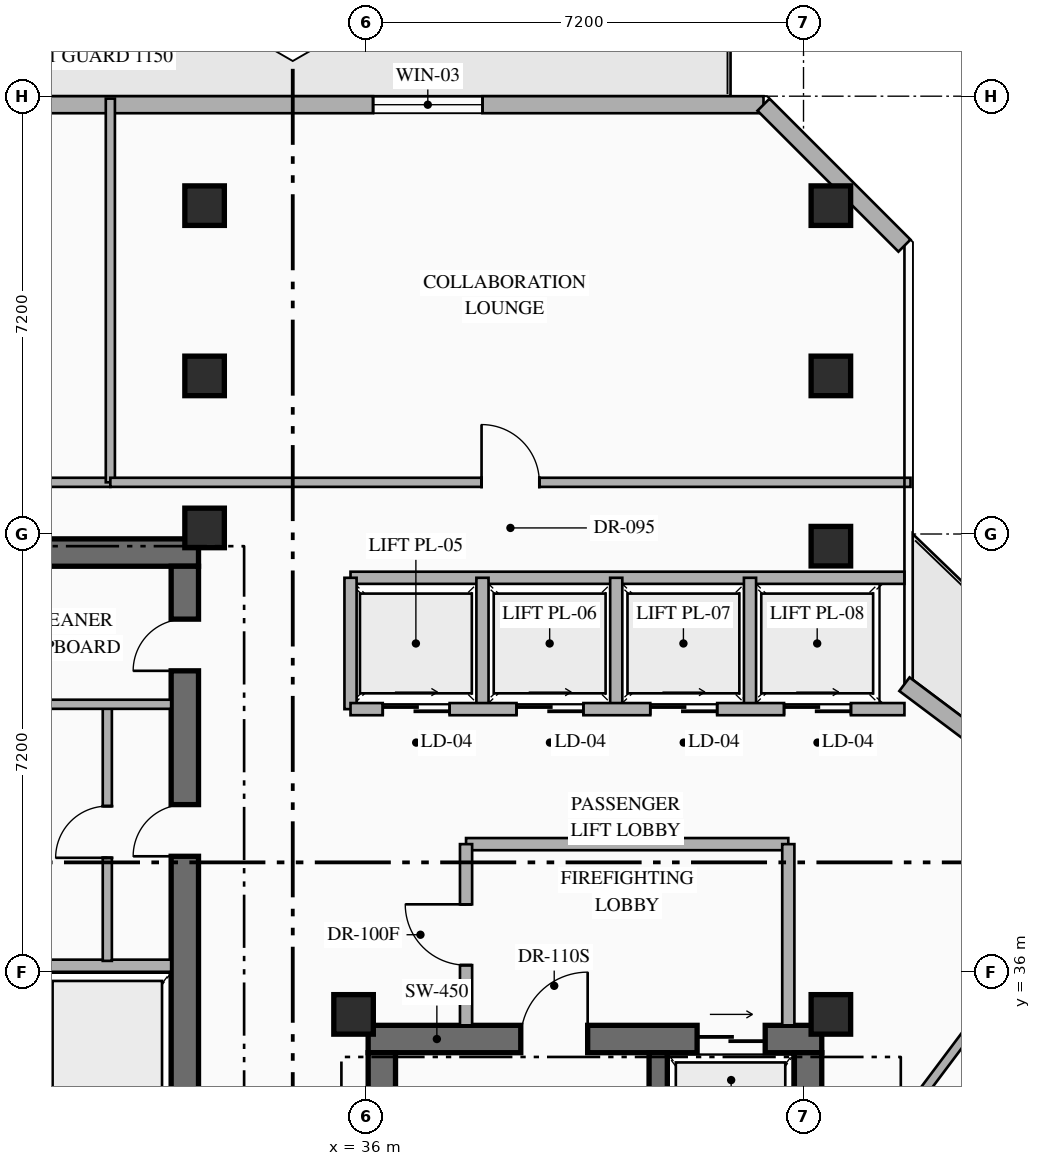
"""IFC4 building model, lengths in metres.
Left out: names, types, materials, properties, quantities, classifications, styles, units other than length and angle.
Written with IfcOpenShell. Run it as: python <this file> out.ifc"""

import sys

from ifc_helpers import new_model, si_unit, direction, frame, frame_2d, origin, origin_2d, place, context, subcontext, project, spatial, rectangle, hollow_rectangle, extrude, element, fill, save


model = new_model("IFC4")
c1 = context("Model", 3, precision=1e-05, world=origin(), true_north=direction((0.0, 1.0)))
c2 = subcontext(c1, "Body", "Model", "MODEL_VIEW")
j1 = project(units=[si_unit("LENGTHUNIT", "METRE"), si_unit("PLANEANGLEUNIT", "RADIAN")], contexts=[c1])
p1 = place(None, origin())
s1 = spatial("IfcSite", under=j1, at=p1, CompositionType="ELEMENT")
p2 = place(p1, origin())
s2 = spatial("IfcBuilding", under=s1, at=p2, CompositionType="ELEMENT")
p3 = place(p2, frame((0.0, 0.0, 253.95)))
s3 = spatial("IfcBuildingStorey", under=s2, at=p3, CompositionType="ELEMENT", Elevation=253.95)
p4 = place(p3, frame((25.77, 42.895, 0.0), z_axis=(0.0, 0.0, 1.0), x_axis=(1.0, 0.0, 0.0)))
e1 = element("IfcWall", 1, at=p4, inside=s3, PredefinedType="SHEAR", context=c2, shape_type="SweptSolid", body=[
    extrude(rectangle(XDim=7.48, YDim=0.45, at=frame_2d((3.74, 0.0))), origin(), (0.0, 0.0, 1.0), 3.6),
])
p5 = place(p3, frame((33.025, 33.19, 0.0), z_axis=(0.0, 0.0, 1.0), x_axis=(0.0, 1.0, 0.0)))
e2 = element("IfcWall", 2, at=p5, inside=s3, PredefinedType="SHEAR", context=c2, shape_type="SweptSolid", body=[
    extrude(rectangle(XDim=9.48, YDim=0.45, at=frame_2d((4.74, 0.0))), origin(), (0.0, 0.0, 1.0), 3.6),
])
p6 = place(p5, frame((4.71, 0.0, 0.0)))
e3 = element("IfcOpeningElement", 3, at=p6, cuts=e2, PredefinedType="OPENING", context=c2, shape_type="SweptSolid", body=[
    extrude(rectangle(XDim=0.85, YDim=2.08, at=frame_2d((0.425, 1.04))), frame((0.0, 0.235, 0.0), z_axis=(0.0, -1.0, 0.0), x_axis=(1.0, 0.0, 0.0)), (0.0, 0.0, 1.0), 0.47),
])
p7 = place(p5, frame((7.76, 0.0, 0.0)))
e4 = element("IfcOpeningElement", 4, at=p7, cuts=e2, PredefinedType="OPENING", context=c2, shape_type="SweptSolid", body=[
    extrude(rectangle(XDim=0.85, YDim=2.08, at=frame_2d((0.425, 1.04))), frame((0.0, 0.235, 0.0), z_axis=(0.0, -1.0, 0.0), x_axis=(1.0, 0.0, 0.0)), (0.0, 0.0, 1.0), 0.47),
])
p8 = place(p3, frame((36.04, 34.895, 0.0), z_axis=(0.0, 0.0, 1.0), x_axis=(1.0, 0.0, 0.0)))
e5 = element("IfcWall", 5, at=p8, inside=s3, PredefinedType="SHEAR", context=c2, shape_type="SweptSolid", body=[
    extrude(rectangle(XDim=7.46, YDim=0.45, at=frame_2d((3.73, 0.0))), origin(), (0.0, 0.0, 1.0), 3.6),
])
p9 = place(p8, frame((2.51, 0.0, 0.0)))
e6 = element("IfcOpeningElement", 6, at=p9, cuts=e5, PredefinedType="OPENING", context=c2, shape_type="SweptSolid", body=[
    extrude(rectangle(XDim=1.1, YDim=2.2, at=frame_2d((0.55, 1.1))), frame((0.0, 0.235, 0.0), z_axis=(0.0, -1.0, 0.0), x_axis=(1.0, 0.0, 0.0)), (0.0, 0.0, 1.0), 0.47),
])
p10 = place(p8, frame((5.41, 0.0, 0.0)))
e7 = element("IfcOpeningElement", 7, at=p10, cuts=e5, PredefinedType="OPENING", context=c2, shape_type="SweptSolid", body=[
    extrude(rectangle(XDim=1.12, YDim=2.15, at=frame_2d((0.56, 1.075))), frame((0.0, 0.235, 0.0), z_axis=(0.0, -1.0, 0.0), x_axis=(1.0, 0.0, 0.0)), (0.0, 0.0, 1.0), 0.47),
])
p11 = place(p3, frame((36.265, 25.19, 0.0), z_axis=(0.0, 0.0, 1.0), x_axis=(0.0, 1.0, 0.0)))
e8 = element("IfcWall", 8, at=p11, inside=s3, PredefinedType="SHEAR", context=c2, shape_type="SweptSolid", body=[
    extrude(rectangle(XDim=9.48, YDim=0.45, at=frame_2d((4.74, 0.0))), origin(), (0.0, 0.0, 1.0), 3.6),
])
p12 = place(p3, frame((43.275, 25.19, 0.0), z_axis=(0.0, 0.0, 1.0), x_axis=(0.0, 1.0, 0.0)))
e9 = element("IfcWall", 9, at=p12, inside=s3, PredefinedType="SHEAR", context=c2, shape_type="SweptSolid", body=[
    extrude(rectangle(XDim=9.48, YDim=0.45, at=frame_2d((4.74, 0.0))), origin(), (0.0, 0.0, 1.0), 3.6),
])
p13 = place(p12, frame((1.51, 0.0, 0.0)))
e10 = element("IfcOpeningElement", 10, at=p13, cuts=e9, PredefinedType="OPENING", context=c2, shape_type="SweptSolid", body=[
    extrude(rectangle(XDim=0.85, YDim=2.08, at=frame_2d((0.425, 1.04))), frame((0.0, 0.235, 0.0), z_axis=(0.0, -1.0, 0.0), x_axis=(1.0, 0.0, 0.0)), (0.0, 0.0, 1.0), 0.47),
])
p14 = place(p12, frame((4.76, 0.0, 0.0)))
e11 = element("IfcOpeningElement", 11, at=p14, cuts=e9, PredefinedType="OPENING", context=c2, shape_type="SweptSolid", body=[
    extrude(rectangle(XDim=0.85, YDim=2.08, at=frame_2d((0.425, 1.04))), frame((0.0, 0.235, 0.0), z_axis=(0.0, -1.0, 0.0), x_axis=(1.0, 0.0, 0.0)), (0.0, 0.0, 1.0), 0.47),
])
p15 = place(p3, frame((40.81, 25.19, 0.0), z_axis=(0.0, 0.0, 1.0), x_axis=(0.0, 1.0, 0.0)))
e12 = element("IfcWall", 12, at=p15, inside=s3, PredefinedType="SHEAR", context=c2, shape_type="SweptSolid", body=[
    extrude(rectangle(XDim=9.48, YDim=0.3, at=frame_2d((4.74, 0.0))), origin(), (0.0, 0.0, 1.0), 3.6),
])
for number, where, z_axis, x_axis in (
    (13, (33.35, 43.3, 0.0), (0.0, 0.0, 1.0), (1.0, 0.0, 0.0)),
    (14, (35.8, 35.3, 0.0), (0.0, 0.0, 1.0), (1.0, 0.0, 0.0)),
    (15, (43.65, 35.3, 0.0), (0.0, 0.0, 1.0), (1.0, 0.0, 0.0)),
    (16, (43.65, 43.0, 0.0), (0.0, 0.0, 1.0), (1.0, 0.0, 0.0)),
    (17, (33.35, 45.8, 0.0), (0.0, 0.0, 1.0), (1.0, 0.0, 0.0)),
    (18, (43.65, 45.8, 0.0), (0.0, 0.0, 1.0), (1.0, 0.0, 0.0)),
    (19, (33.35, 48.6, 0.0), (0.0, 0.0, 1.0), (1.0, 0.0, 0.0)),
    (20, (43.65, 48.6, 0.0), (0.0, 0.0, 1.0), (1.0, 0.0, 0.0)),
):
    element("IfcColumn", number, at=place(p3, frame(where, z_axis=z_axis, x_axis=x_axis)), inside=s3, PredefinedType="COLUMN", context=c2, shape_type="SweptSolid", body=[
        extrude(hollow_rectangle(XDim=0.65, YDim=0.65, WallThickness=0.025, at=origin_2d()), origin(), (0.0, 0.0, 1.0), 3.6),
    ])
p16 = place(p3, frame((44.86, 40.73, 0.0), z_axis=(0.0, 0.0, 1.0), x_axis=(0.800022950109, -0.599969398635, 0.0)))
e21 = element("IfcWall", 21, at=p16, inside=s3, PredefinedType="STANDARD", context=c2, shape_type="SweptSolid", body=[
    extrude(rectangle(XDim=10.212, YDim=0.28, at=frame_2d((5.106, 0.0))), origin(), (0.0, 0.0, 1.0), 3.35),
])
p17 = place(p16, frame((1.901, 0.0, 0.0)))
e22 = element("IfcOpeningElement", 22, at=p17, cuts=e21, PredefinedType="OPENING", context=c2, shape_type="SweptSolid", body=[
    extrude(rectangle(XDim=1.1, YDim=2.2, at=frame_2d((0.55, 1.1))), frame((0.0, 0.15, 0.0), z_axis=(0.0, -1.0, 0.0), x_axis=(1.0, 0.0, 0.0)), (0.0, 0.0, 1.0), 0.3),
])
p18 = place(p16, frame((5.84, 0.0, 0.85)))
e23 = element("IfcOpeningElement", 23, at=p18, cuts=e21, PredefinedType="OPENING", context=c2, shape_type="SweptSolid", body=[
    extrude(rectangle(XDim=1.8, YDim=2.1, at=frame_2d((0.9, 1.05))), frame((0.0, 0.15, 0.0), z_axis=(0.0, -1.0, 0.0), x_axis=(1.0, 0.0, 0.0)), (0.0, 0.0, 1.0), 0.3),
])
p19 = place(p3, frame((20.458, 50.26, 0.0), z_axis=(0.0, 0.0, 1.0), x_axis=(1.0, 0.0, 0.0)))
e24 = element("IfcWall", 24, at=p19, inside=s3, PredefinedType="STANDARD", context=c2, shape_type="SweptSolid", body=[
    extrude(rectangle(XDim=22.084, YDim=0.28, at=frame_2d((11.042, 0.0))), origin(), (0.0, 0.0, 1.0), 3.35),
])
p20 = place(p19, frame((2.1, 0.0, 0.0)))
e25 = element("IfcOpeningElement", 25, at=p20, cuts=e24, PredefinedType="OPENING", context=c2, shape_type="SweptSolid", body=[
    extrude(rectangle(XDim=1.1, YDim=2.2, at=frame_2d((0.55, 1.1))), frame((0.0, 0.15, 0.0), z_axis=(0.0, -1.0, 0.0), x_axis=(1.0, 0.0, 0.0)), (0.0, 0.0, 1.0), 0.3),
])
p21 = place(p19, frame((15.663, 0.0, 0.85)))
e26 = element("IfcOpeningElement", 26, at=p21, cuts=e24, PredefinedType="OPENING", context=c2, shape_type="SweptSolid", body=[
    extrude(rectangle(XDim=1.8, YDim=2.1, at=frame_2d((0.9, 1.05))), frame((0.0, 0.15, 0.0), z_axis=(0.0, -1.0, 0.0), x_axis=(1.0, 0.0, 0.0)), (0.0, 0.0, 1.0), 0.3),
])
p22 = place(p3, frame((42.542, 50.26, 0.0), z_axis=(0.0, 0.0, 1.0), x_axis=(0.707106781187, -0.707106781187, 0.0)))
e27 = element("IfcWall", 27, at=p22, inside=s3, PredefinedType="STANDARD", context=c2, shape_type="SweptSolid", body=[
    extrude(rectangle(XDim=3.278, YDim=0.28, at=frame_2d((1.639, 0.0))), origin(), (0.0, 0.0, 1.0), 3.35),
])
p23 = place(p3, frame((30.7, 36.1, 0.0), z_axis=(0.0, 0.0, 1.0), x_axis=(1.0, 0.0, 0.0)))
e28 = element("IfcWall", 28, at=p23, inside=s3, PredefinedType="STANDARD", context=c2, shape_type="SweptSolid", body=[
    extrude(rectangle(XDim=2.1, YDim=0.2, at=frame_2d((1.05, 0.0))), origin(), (0.0, 0.0, 1.0), 3.35),
])
p24 = place(p3, frame((31.75, 36.18, 0.0), z_axis=(0.0, 0.0, 1.0), x_axis=(0.0, 1.0, 0.0)))
e29 = element("IfcWall", 29, at=p24, inside=s3, PredefinedType="PARTITIONING", context=c2, shape_type="SweptSolid", body=[
    extrude(rectangle(XDim=4.24, YDim=0.15, at=frame_2d((2.12, 0.0))), origin(), (0.0, 0.0, 1.0), 3.35),
])
p25 = place(p24, frame((1.695, 0.0, 0.0)))
e30 = element("IfcOpeningElement", 30, at=p25, cuts=e29, PredefinedType="OPENING", context=c2, shape_type="SweptSolid", body=[
    extrude(rectangle(XDim=0.85, YDim=2.08, at=frame_2d((0.425, 1.04))), frame((0.0, 0.085, 0.0), z_axis=(0.0, -1.0, 0.0), x_axis=(1.0, 0.0, 0.0)), (0.0, 0.0, 1.0), 0.17),
])
p26 = place(p3, frame((30.7, 40.4, 0.0), z_axis=(0.0, 0.0, 1.0), x_axis=(1.0, 0.0, 0.0)))
e31 = element("IfcWall", 31, at=p26, inside=s3, PredefinedType="PARTITIONING", context=c2, shape_type="SweptSolid", body=[
    extrude(rectangle(XDim=2.1, YDim=0.15, at=frame_2d((1.05, 0.0))), origin(), (0.0, 0.0, 1.0), 3.35),
])
p27 = place(p3, frame((37.65, 38.1, 0.0), z_axis=(0.0, 0.0, 1.0), x_axis=(1.0, 0.0, 0.0)))
e32 = element("IfcWall", 32, at=p27, inside=s3, PredefinedType="STANDARD", context=c2, shape_type="SweptSolid", body=[
    extrude(rectangle(XDim=5.3, YDim=0.2, at=frame_2d((2.65, 0.0))), origin(), (0.0, 0.0, 1.0), 3.35),
])
p28 = place(p3, frame((42.95, 35.12, 0.0), z_axis=(0.0, 0.0, 1.0), x_axis=(0.0, 1.0, 0.0)))
e33 = element("IfcWall", 33, at=p28, inside=s3, PredefinedType="STANDARD", context=c2, shape_type="SweptSolid", body=[
    extrude(rectangle(XDim=2.98, YDim=0.2, at=frame_2d((1.49, 0.0))), origin(), (0.0, 0.0, 1.0), 3.35),
])
p29 = place(p3, frame((37.65, 35.12, 0.0), z_axis=(0.0, 0.0, 1.0), x_axis=(0.0, 1.0, 0.0)))
e34 = element("IfcWall", 34, at=p29, inside=s3, PredefinedType="STANDARD", context=c2, shape_type="SweptSolid", body=[
    extrude(rectangle(XDim=2.98, YDim=0.2, at=frame_2d((1.49, 0.0))), origin(), (0.0, 0.0, 1.0), 3.35),
])
p30 = place(p29, frame((0.99, 0.0, 0.0)))
e35 = element("IfcOpeningElement", 35, at=p30, cuts=e34, PredefinedType="OPENING", context=c2, shape_type="SweptSolid", body=[
    extrude(rectangle(XDim=1.0, YDim=2.2, at=frame_2d((0.5, 1.1))), frame((0.0, 0.11, 0.0), z_axis=(0.0, -1.0, 0.0), x_axis=(1.0, 0.0, 0.0)), (0.0, 0.0, 1.0), 0.22),
])
p31 = place(p3, frame((35.75, 42.48, 0.0), z_axis=(0.0, 0.0, 1.0), x_axis=(1.0, 0.0, 0.0)))
e36 = element("IfcWall", 36, at=p31, inside=s3, PredefinedType="STANDARD", context=c2, shape_type="SweptSolid", body=[
    extrude(rectangle(XDim=9.11, YDim=0.2, at=frame_2d((4.555, 0.0))), origin(), (0.0, 0.0, 1.0), 3.35),
])
for number, where, z_axis, x_axis in (
    (37, (35.75, 40.32, 0.0), (0.0, 0.0, 1.0), (0.0, 1.0, 0.0)),
    (38, (37.92, 40.32, 0.0), (0.0, 0.0, 1.0), (0.0, 1.0, 0.0)),
    (39, (40.12, 40.32, 0.0), (0.0, 0.0, 1.0), (0.0, 1.0, 0.0)),
    (40, (42.32, 40.32, 0.0), (0.0, 0.0, 1.0), (0.0, 1.0, 0.0)),
):
    element("IfcWall", number, at=place(p3, frame(where, z_axis=z_axis, x_axis=x_axis)), inside=s3, PredefinedType="STANDARD", context=c2, shape_type="SweptSolid", body=[
        extrude(rectangle(XDim=2.16, YDim=0.2, at=frame_2d((1.08, 0.0))), origin(), (0.0, 0.0, 1.0), 3.35),
    ])
p32 = place(p3, frame((35.75, 40.32, 0.0), z_axis=(0.0, 0.0, 1.0), x_axis=(1.0, 0.0, 0.0)))
e41 = element("IfcWall", 41, at=p32, inside=s3, PredefinedType="STANDARD", context=c2, shape_type="SweptSolid", body=[
    extrude(rectangle(XDim=9.11, YDim=0.2, at=frame_2d((4.555, 0.0))), origin(), (0.0, 0.0, 1.0), 3.35),
])
p33 = place(p32, frame((0.53, 0.0, 0.0)))
e42 = element("IfcOpeningElement", 42, at=p33, cuts=e41, PredefinedType="OPENING", context=c2, shape_type="SweptSolid", body=[
    extrude(rectangle(XDim=1.1, YDim=2.18, at=frame_2d((0.55, 1.09))), frame((0.0, 0.11, 0.0), z_axis=(0.0, -1.0, 0.0), x_axis=(1.0, 0.0, 0.0)), (0.0, 0.0, 1.0), 0.22),
])
p34 = place(p32, frame((2.73, 0.0, 0.0)))
e43 = element("IfcOpeningElement", 43, at=p34, cuts=e41, PredefinedType="OPENING", context=c2, shape_type="SweptSolid", body=[
    extrude(rectangle(XDim=1.1, YDim=2.18, at=frame_2d((0.55, 1.09))), frame((0.0, 0.11, 0.0), z_axis=(0.0, -1.0, 0.0), x_axis=(1.0, 0.0, 0.0)), (0.0, 0.0, 1.0), 0.22),
])
p35 = place(p32, frame((4.93, 0.0, 0.0)))
e44 = element("IfcOpeningElement", 44, at=p35, cuts=e41, PredefinedType="OPENING", context=c2, shape_type="SweptSolid", body=[
    extrude(rectangle(XDim=1.1, YDim=2.18, at=frame_2d((0.55, 1.09))), frame((0.0, 0.11, 0.0), z_axis=(0.0, -1.0, 0.0), x_axis=(1.0, 0.0, 0.0)), (0.0, 0.0, 1.0), 0.22),
])
p36 = place(p32, frame((7.13, 0.0, 0.0)))
e45 = element("IfcOpeningElement", 45, at=p36, cuts=e41, PredefinedType="OPENING", context=c2, shape_type="SweptSolid", body=[
    extrude(rectangle(XDim=1.1, YDim=2.18, at=frame_2d((0.55, 1.09))), frame((0.0, 0.11, 0.0), z_axis=(0.0, -1.0, 0.0), x_axis=(1.0, 0.0, 0.0)), (0.0, 0.0, 1.0), 0.22),
])
p37 = place(p3, frame((20.9, 44.05, 0.0), z_axis=(0.0, 0.0, 1.0), x_axis=(1.0, 0.0, 0.0)))
e46 = element("IfcWall", 46, at=p37, inside=s3, PredefinedType="PARTITIONING", context=c2, shape_type="SweptSolid", body=[
    extrude(rectangle(XDim=10.9, YDim=0.15, at=frame_2d((5.45, 0.0))), origin(), (0.0, 0.0, 1.0), 3.35),
])
p38 = place(p37, frame((2.678, 0.0, 0.0)))
e47 = element("IfcOpeningElement", 47, at=p38, cuts=e46, PredefinedType="OPENING", context=c2, shape_type="SweptSolid", body=[
    extrude(rectangle(XDim=0.95, YDim=2.15, at=frame_2d((0.475, 1.075))), frame((0.0, 0.085, 0.0), z_axis=(0.0, -1.0, 0.0), x_axis=(1.0, 0.0, 0.0)), (0.0, 0.0, 1.0), 0.17),
])
p39 = place(p3, frame((31.8, 44.05, 0.0), z_axis=(0.0, 0.0, 1.0), x_axis=(0.0, 1.0, 0.0)))
e48 = element("IfcWall", 48, at=p39, inside=s3, PredefinedType="PARTITIONING", context=c2, shape_type="SweptSolid", body=[
    extrude(rectangle(XDim=6.31, YDim=0.15, at=frame_2d((3.155, 0.0))), origin(), (0.0, 0.0, 1.0), 3.35),
])
p40 = place(p3, frame((31.8, 44.05, 0.0), z_axis=(0.0, 0.0, 1.0), x_axis=(1.0, 0.0, 0.0)))
e49 = element("IfcWall", 49, at=p40, inside=s3, PredefinedType="PARTITIONING", context=c2, shape_type="SweptSolid", body=[
    extrude(rectangle(XDim=13.16, YDim=0.15, at=frame_2d((6.58, 0.0))), origin(), (0.0, 0.0, 1.0), 3.35),
])
p41 = place(p40, frame((6.105, 0.0, 0.0)))
e50 = element("IfcOpeningElement", 50, at=p41, cuts=e49, PredefinedType="OPENING", context=c2, shape_type="SweptSolid", body=[
    extrude(rectangle(XDim=0.95, YDim=2.15, at=frame_2d((0.475, 1.075))), frame((0.0, 0.085, 0.0), z_axis=(0.0, -1.0, 0.0), x_axis=(1.0, 0.0, 0.0)), (0.0, 0.0, 1.0), 0.17),
])
p42 = place(p3, frame((44.82, 33.56, 0.0), z_axis=(0.0, 0.0, 1.0), x_axis=(0.599986667805, 0.800009998972, 0.0)))
e51 = element("IfcWall", 51, at=p42, inside=s3, PredefinedType="PARTITIONING", context=c2, shape_type="SweptSolid", body=[
    extrude(rectangle(XDim=5.86, YDim=0.15, at=frame_2d((2.93, 0.0))), origin(), (0.0, 0.0, 1.0), 3.35),
])
p43 = place(p42, frame((2.69, 0.0, 0.0)))
e52 = element("IfcOpeningElement", 52, at=p43, cuts=e51, PredefinedType="OPENING", context=c2, shape_type="SweptSolid", body=[
    extrude(rectangle(XDim=0.9, YDim=2.15, at=frame_2d((0.45, 1.075))), frame((0.0, 0.085, 0.0), z_axis=(0.0, -1.0, 0.0), x_axis=(1.0, 0.0, 0.0)), (0.0, 0.0, 1.0), 0.17),
])
p44 = place(p21, origin())
e53 = element("IfcWindow", 53, at=p44, inside=s3, PartitioningType="SINGLE_PANEL", PredefinedType="WINDOW", context=c2, shape_type="SweptSolid", body=[
    extrude(rectangle(XDim=1.8, YDim=2.1, at=frame_2d((0.9, 1.05))), frame((0.0, 0.03, 0.0), z_axis=(0.0, -1.0, 0.0), x_axis=(1.0, 0.0, 0.0)), (0.0, 0.0, 1.0), 0.06),
])
fill(e26, e53)
p45 = place(p9, origin())
e54 = element("IfcDoor", 54, at=p45, inside=s3, OperationType="SINGLE_SWING_RIGHT", PredefinedType="DOOR", context=c2, shape_type="SweptSolid", body=[
    extrude(rectangle(XDim=1.1, YDim=2.2, at=frame_2d((0.55, 1.1))), frame((0.0, 0.025, 0.0), z_axis=(0.0, -1.0, 0.0), x_axis=(1.0, 0.0, 0.0)), (0.0, 0.0, 1.0), 0.05),
])
fill(e6, e54)
p46 = place(p10, origin())
e55 = element("IfcDoor", 55, at=p46, inside=s3, OperationType="SLIDING_TO_RIGHT", PredefinedType="USERDEFINED", context=c2, shape_type="SweptSolid", body=[
    extrude(rectangle(XDim=1.12, YDim=2.15, at=frame_2d((0.56, 1.075))), frame((0.0, 0.025, 0.0), z_axis=(0.0, -1.0, 0.0), x_axis=(1.0, 0.0, 0.0)), (0.0, 0.0, 1.0), 0.05),
])
fill(e7, e55)
p47 = place(p6, origin())
e56 = element("IfcDoor", 56, at=p47, inside=s3, OperationType="SINGLE_SWING_LEFT", PredefinedType="DOOR", context=c2, shape_type="SweptSolid", body=[
    extrude(rectangle(XDim=0.85, YDim=2.08, at=frame_2d((0.425, 1.04))), frame((0.0, 0.025, 0.0), z_axis=(0.0, -1.0, 0.0), x_axis=(1.0, 0.0, 0.0)), (0.0, 0.0, 1.0), 0.05),
])
fill(e3, e56)
p48 = place(p7, origin())
e57 = element("IfcDoor", 57, at=p48, inside=s3, OperationType="SINGLE_SWING_LEFT", PredefinedType="DOOR", context=c2, shape_type="SweptSolid", body=[
    extrude(rectangle(XDim=0.85, YDim=2.08, at=frame_2d((0.425, 1.04))), frame((0.0, 0.025, 0.0), z_axis=(0.0, -1.0, 0.0), x_axis=(1.0, 0.0, 0.0)), (0.0, 0.0, 1.0), 0.05),
])
fill(e4, e57)
p49 = place(p25, origin())
e58 = element("IfcDoor", 58, at=p49, inside=s3, OperationType="SINGLE_SWING_LEFT", PredefinedType="DOOR", context=c2, shape_type="SweptSolid", body=[
    extrude(rectangle(XDim=0.85, YDim=2.08, at=frame_2d((0.425, 1.04))), frame((0.0, 0.025, 0.0), z_axis=(0.0, -1.0, 0.0), x_axis=(1.0, 0.0, 0.0)), (0.0, 0.0, 1.0), 0.05),
])
fill(e30, e58)
p50 = place(p30, origin())
e59 = element("IfcDoor", 59, at=p50, inside=s3, OperationType="SINGLE_SWING_RIGHT", PredefinedType="DOOR", context=c2, shape_type="SweptSolid", body=[
    extrude(rectangle(XDim=1.0, YDim=2.2, at=frame_2d((0.5, 1.1))), frame((0.0, 0.025, 0.0), z_axis=(0.0, -1.0, 0.0), x_axis=(1.0, 0.0, 0.0)), (0.0, 0.0, 1.0), 0.05),
])
fill(e35, e59)
p51 = place(p33, origin())
e60 = element("IfcDoor", 60, at=p51, inside=s3, OperationType="SLIDING_TO_RIGHT", PredefinedType="USERDEFINED", context=c2, shape_type="SweptSolid", body=[
    extrude(rectangle(XDim=1.1, YDim=2.18, at=frame_2d((0.55, 1.09))), frame((0.0, 0.025, 0.0), z_axis=(0.0, -1.0, 0.0), x_axis=(1.0, 0.0, 0.0)), (0.0, 0.0, 1.0), 0.05),
])
fill(e42, e60)
p52 = place(p34, origin())
e61 = element("IfcDoor", 61, at=p52, inside=s3, OperationType="SLIDING_TO_RIGHT", PredefinedType="USERDEFINED", context=c2, shape_type="SweptSolid", body=[
    extrude(rectangle(XDim=1.1, YDim=2.18, at=frame_2d((0.55, 1.09))), frame((0.0, 0.025, 0.0), z_axis=(0.0, -1.0, 0.0), x_axis=(1.0, 0.0, 0.0)), (0.0, 0.0, 1.0), 0.05),
])
fill(e43, e61)
p53 = place(p35, origin())
e62 = element("IfcDoor", 62, at=p53, inside=s3, OperationType="SLIDING_TO_RIGHT", PredefinedType="USERDEFINED", context=c2, shape_type="SweptSolid", body=[
    extrude(rectangle(XDim=1.1, YDim=2.18, at=frame_2d((0.55, 1.09))), frame((0.0, 0.025, 0.0), z_axis=(0.0, -1.0, 0.0), x_axis=(1.0, 0.0, 0.0)), (0.0, 0.0, 1.0), 0.05),
])
fill(e44, e62)
p54 = place(p36, origin())
e63 = element("IfcDoor", 63, at=p54, inside=s3, OperationType="SLIDING_TO_RIGHT", PredefinedType="USERDEFINED", context=c2, shape_type="SweptSolid", body=[
    extrude(rectangle(XDim=1.1, YDim=2.18, at=frame_2d((0.55, 1.09))), frame((0.0, 0.025, 0.0), z_axis=(0.0, -1.0, 0.0), x_axis=(1.0, 0.0, 0.0)), (0.0, 0.0, 1.0), 0.05),
])
fill(e45, e63)
p55 = place(p41, origin())
e64 = element("IfcDoor", 64, at=p55, inside=s3, OperationType="SINGLE_SWING_LEFT", PredefinedType="DOOR", context=c2, shape_type="SweptSolid", body=[
    extrude(rectangle(XDim=0.95, YDim=2.15, at=frame_2d((0.475, 1.075))), frame((0.0, 0.025, 0.0), z_axis=(0.0, -1.0, 0.0), x_axis=(1.0, 0.0, 0.0)), (0.0, 0.0, 1.0), 0.05),
])
fill(e50, e64)
save(model, sys.argv[1])
